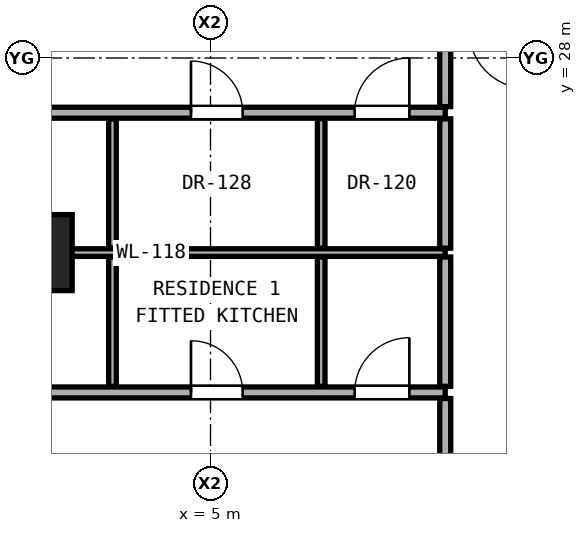
"""IFC4 building model, lengths in metres.
Left out: names, types, materials, properties, quantities, classifications, styles, units other than length and angle.
Written with IfcOpenShell. Run it as: python <this file> out.ifc"""

import sys

from ifc_helpers import new_model, si_unit, direction, frame, frame_2d, origin, origin_2d, place, context, subcontext, project, spatial, rectangle, hollow_rectangle, extrude, element, fill, save


model = new_model("IFC4")
c1 = context("Model", 3, precision=1e-05, world=origin(), true_north=direction((0.0, 1.0)))
c2 = subcontext(c1, "Body", "Model", "MODEL_VIEW")
j1 = project(units=[si_unit("LENGTHUNIT", "METRE"), si_unit("PLANEANGLEUNIT", "RADIAN")], contexts=[c1])
p1 = place(None, origin())
s1 = spatial("IfcSite", under=j1, at=p1, CompositionType="ELEMENT")
p2 = place(p1, origin())
s2 = spatial("IfcBuilding", under=s1, at=p2, CompositionType="ELEMENT")
p3 = place(p2, frame((0.0, 0.0, 71.9)))
s3 = spatial("IfcBuildingStorey", under=s2, at=p3, CompositionType="ELEMENT", Elevation=71.9)
p4 = place(p3, frame((2.1, 24.8, 0.0), z_axis=(0.0, 0.0, 1.0), x_axis=(1.0, 0.0, 0.0)))
e1 = element("IfcColumn", 1, at=p4, inside=s3, PredefinedType="COLUMN", context=c2, shape_type="SweptSolid", body=[
    extrude(hollow_rectangle(XDim=1.25, YDim=1.25, WallThickness=0.07, at=origin_2d()), origin(), (0.0, 0.0, 1.0), 3.3),
])
p5 = place(p3, frame((-1.76, 22.5, 0.0), z_axis=(0.0, 0.0, 1.0), x_axis=(1.0, 0.0, 0.0)))
e2 = element("IfcWall", 2, at=p5, inside=s3, PredefinedType="PARTITIONING", context=c2, shape_type="SweptSolid", body=[
    extrude(rectangle(XDim=10.62, YDim=0.18, at=frame_2d((5.31, 0.0))), origin(), (0.0, 0.0, 1.0), 2.125),
])
p6 = place(p5, frame((2.169, 0.0, 0.0)))
e3 = element("IfcOpeningElement", 3, at=p6, cuts=e2, PredefinedType="OPENING", context=c2, shape_type="SweptSolid", body=[
    extrude(rectangle(XDim=0.85, YDim=2.01, at=frame_2d((0.425, 1.005))), frame((0.0, 0.1, 0.0), z_axis=(0.0, -1.0, 0.0), x_axis=(1.0, 0.0, 0.0)), (0.0, 0.0, 1.0), 0.2),
])
p7 = place(p5, frame((6.439, 0.0, 0.0)))
e4 = element("IfcOpeningElement", 4, at=p7, cuts=e2, PredefinedType="OPENING", context=c2, shape_type="SweptSolid", body=[
    extrude(rectangle(XDim=0.85, YDim=2.01, at=frame_2d((0.425, 1.005))), frame((0.0, 0.1, 0.0), z_axis=(0.0, -1.0, 0.0), x_axis=(1.0, 0.0, 0.0)), (0.0, 0.0, 1.0), 0.2),
])
p8 = place(p5, frame((9.13, 0.0, 0.0)))
e5 = element("IfcOpeningElement", 5, at=p8, cuts=e2, PredefinedType="OPENING", context=c2, shape_type="SweptSolid", body=[
    extrude(rectangle(XDim=0.9, YDim=2.1, at=frame_2d((0.45, 1.05))), frame((0.0, 0.1, 0.0), z_axis=(0.0, -1.0, 0.0), x_axis=(1.0, 0.0, 0.0)), (0.0, 0.0, 1.0), 0.2),
])
p9 = place(p3, frame((-1.76, 24.8, 0.0), z_axis=(0.0, 0.0, 1.0), x_axis=(1.0, 0.0, 0.0)))
e6 = element("IfcWall", 6, at=p9, inside=s3, PredefinedType="PARTITIONING", context=c2, shape_type="SweptSolid", body=[
    extrude(rectangle(XDim=10.62, YDim=0.125, at=frame_2d((5.31, 0.0))), origin(), (0.0, 0.0, 1.0), 2.125),
])
p10 = place(p3, frame((-1.76, 27.1, 0.0), z_axis=(0.0, 0.0, 1.0), x_axis=(1.0, 0.0, 0.0)))
e7 = element("IfcWall", 7, at=p10, inside=s3, PredefinedType="PARTITIONING", context=c2, shape_type="SweptSolid", body=[
    extrude(rectangle(XDim=10.62, YDim=0.18, at=frame_2d((5.31, 0.0))), origin(), (0.0, 0.0, 1.0), 2.125),
])
p11 = place(p10, frame((2.169, 0.0, 0.0)))
e8 = element("IfcOpeningElement", 8, at=p11, cuts=e7, PredefinedType="OPENING", context=c2, shape_type="SweptSolid", body=[
    extrude(rectangle(XDim=0.85, YDim=2.01, at=frame_2d((0.425, 1.005))), frame((0.0, 0.1, 0.0), z_axis=(0.0, -1.0, 0.0), x_axis=(1.0, 0.0, 0.0)), (0.0, 0.0, 1.0), 0.2),
])
p12 = place(p10, frame((6.439, 0.0, 0.0)))
e9 = element("IfcOpeningElement", 9, at=p12, cuts=e7, PredefinedType="OPENING", context=c2, shape_type="SweptSolid", body=[
    extrude(rectangle(XDim=0.85, YDim=2.01, at=frame_2d((0.425, 1.005))), frame((0.0, 0.1, 0.0), z_axis=(0.0, -1.0, 0.0), x_axis=(1.0, 0.0, 0.0)), (0.0, 0.0, 1.0), 0.2),
])
p13 = place(p10, frame((9.13, 0.0, 0.0)))
e10 = element("IfcOpeningElement", 10, at=p13, cuts=e7, PredefinedType="OPENING", context=c2, shape_type="SweptSolid", body=[
    extrude(rectangle(XDim=0.9, YDim=2.1, at=frame_2d((0.45, 1.05))), frame((0.0, 0.1, 0.0), z_axis=(0.0, -1.0, 0.0), x_axis=(1.0, 0.0, 0.0)), (0.0, 0.0, 1.0), 0.2),
])
for number, where, z_axis, x_axis in (
    (11, (3.388, 22.6, 0.0), (0.0, 0.0, 1.0), (0.0, 1.0, 0.0)),
    (12, (3.388, 24.873, 0.0), (0.0, 0.0, 1.0), (0.0, 1.0, 0.0)),
    (13, (6.82, 22.6, 0.0), (0.0, 0.0, 1.0), (0.0, 1.0, 0.0)),
    (14, (6.82, 24.873, 0.0), (0.0, 0.0, 1.0), (0.0, 1.0, 0.0)),
):
    element("IfcWall", number, at=place(p3, frame(where, z_axis=z_axis, x_axis=x_axis)), inside=s3, PredefinedType="PARTITIONING", context=c2, shape_type="SweptSolid", body=[
        extrude(rectangle(XDim=2.127, YDim=0.125, at=frame_2d((1.064, 0.0))), origin(), (0.0, 0.0, 1.0), 2.279),
    ])
p14 = place(p3, frame((8.86, 14.112, 0.0), z_axis=(0.0, 0.0, 1.0), x_axis=(0.0, 1.0, 0.0)))
e15 = element("IfcWall", 15, at=p14, inside=s3, PredefinedType="PARTITIONING", context=c2, shape_type="SweptSolid", body=[
    extrude(rectangle(XDim=8.288, YDim=0.18, at=frame_2d((4.144, 0.0))), origin(), (0.0, 0.0, 1.0), 2.436),
])
p15 = place(p14, frame((3.619, 0.0, 0.0)))
e16 = element("IfcOpeningElement", 16, at=p15, cuts=e15, PredefinedType="OPENING", context=c2, shape_type="SweptSolid", body=[
    extrude(rectangle(XDim=1.05, YDim=2.2, at=frame_2d((0.525, 1.1))), frame((0.0, 0.1, 0.0), z_axis=(0.0, -1.0, 0.0), x_axis=(1.0, 0.0, 0.0)), (0.0, 0.0, 1.0), 0.2),
])
for number, where, z_axis, x_axis in (
    (17, (8.86, 22.6, 0.0), (0.0, 0.0, 1.0), (0.0, 1.0, 0.0)),
    (18, (8.86, 24.873, 0.0), (0.0, 0.0, 1.0), (0.0, 1.0, 0.0)),
):
    element("IfcWall", number, at=place(p3, frame(where, z_axis=z_axis, x_axis=x_axis)), inside=s3, PredefinedType="PARTITIONING", context=c2, shape_type="SweptSolid", body=[
        extrude(rectangle(XDim=2.127, YDim=0.18, at=frame_2d((1.064, 0.0))), origin(), (0.0, 0.0, 1.0), 2.279),
    ])
p16 = place(p3, frame((8.86, 27.2, 0.0), z_axis=(0.0, 0.0, 1.0), x_axis=(0.0, 1.0, 0.0)))
e19 = element("IfcWall", 19, at=p16, inside=s3, PredefinedType="PARTITIONING", context=c2, shape_type="SweptSolid", body=[
    extrude(rectangle(XDim=14.688, YDim=0.18, at=frame_2d((7.344, 0.0))), origin(), (0.0, 0.0, 1.0), 2.279),
])
p17 = place(p16, frame((6.819, 0.0, 0.0)))
e20 = element("IfcOpeningElement", 20, at=p17, cuts=e19, PredefinedType="OPENING", context=c2, shape_type="SweptSolid", body=[
    extrude(rectangle(XDim=1.05, YDim=2.2, at=frame_2d((0.525, 1.1))), frame((0.0, 0.1, 0.0), z_axis=(0.0, -1.0, 0.0), x_axis=(1.0, 0.0, 0.0)), (0.0, 0.0, 1.0), 0.2),
])
p18 = place(p7, origin())
e21 = element("IfcDoor", 21, at=p18, inside=s3, OperationType="SINGLE_SWING_LEFT", PredefinedType="DOOR", context=c2, shape_type="SweptSolid", body=[
    extrude(rectangle(XDim=0.85, YDim=2.01, at=frame_2d((0.425, 1.005))), frame((0.0, 0.025, 0.0), z_axis=(0.0, -1.0, 0.0), x_axis=(1.0, 0.0, 0.0)), (0.0, 0.0, 1.0), 0.05),
])
fill(e4, e21)
p19 = place(p8, origin())
e22 = element("IfcDoor", 22, at=p19, inside=s3, OperationType="SINGLE_SWING_RIGHT", PredefinedType="DOOR", context=c2, shape_type="SweptSolid", body=[
    extrude(rectangle(XDim=0.9, YDim=2.1, at=frame_2d((0.45, 1.05))), frame((0.0, 0.025, 0.0), z_axis=(0.0, -1.0, 0.0), x_axis=(1.0, 0.0, 0.0)), (0.0, 0.0, 1.0), 0.05),
])
fill(e5, e22)
p20 = place(p12, origin())
e23 = element("IfcDoor", 23, at=p20, inside=s3, OperationType="SINGLE_SWING_LEFT", PredefinedType="DOOR", context=c2, shape_type="SweptSolid", body=[
    extrude(rectangle(XDim=0.85, YDim=2.01, at=frame_2d((0.425, 1.005))), frame((0.0, 0.025, 0.0), z_axis=(0.0, -1.0, 0.0), x_axis=(1.0, 0.0, 0.0)), (0.0, 0.0, 1.0), 0.05),
])
fill(e9, e23)
p21 = place(p13, origin())
e24 = element("IfcDoor", 24, at=p21, inside=s3, OperationType="SINGLE_SWING_RIGHT", PredefinedType="DOOR", context=c2, shape_type="SweptSolid", body=[
    extrude(rectangle(XDim=0.9, YDim=2.1, at=frame_2d((0.45, 1.05))), frame((0.0, 0.025, 0.0), z_axis=(0.0, -1.0, 0.0), x_axis=(1.0, 0.0, 0.0)), (0.0, 0.0, 1.0), 0.05),
])
fill(e10, e24)
save(model, sys.argv[1])
